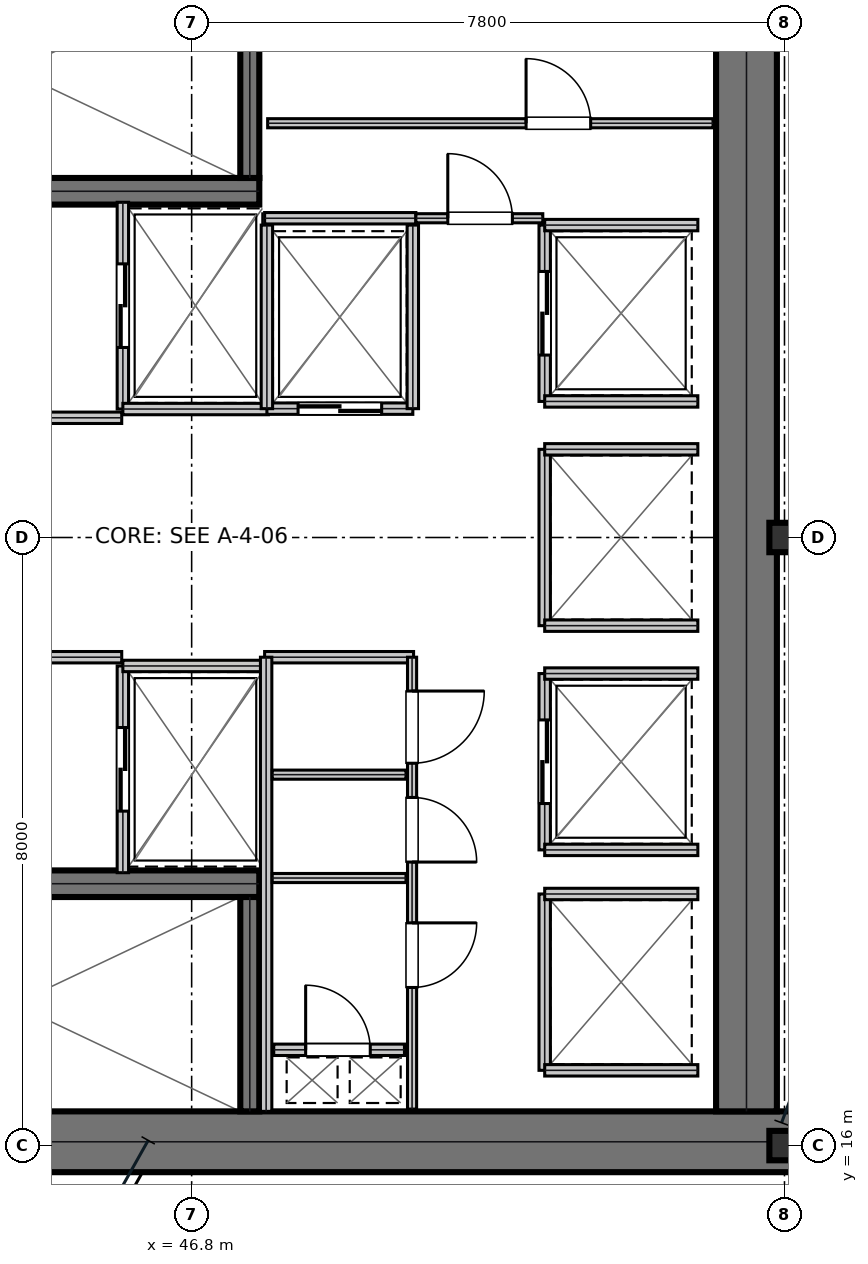
"""IFC4 building model, lengths in metres.
Left out: names, types, materials, properties, quantities, classifications, styles, units other than length and angle.
Written with IfcOpenShell. Run it as: python <this file> out.ifc"""

import sys

from ifc_helpers import new_model, si_unit, direction, frame, frame_2d, origin, origin_2d, place, context, subcontext, project, spatial, rectangle, i_section, extrude, element, fill, save


model = new_model("IFC4")
c1 = context("Model", 3, precision=1e-05, world=origin(), true_north=direction((0.0, 1.0)))
c2 = subcontext(c1, "Body", "Model", "MODEL_VIEW")
j1 = project(units=[si_unit("LENGTHUNIT", "METRE"), si_unit("PLANEANGLEUNIT", "RADIAN")], contexts=[c1])
p1 = place(None, origin())
s1 = spatial("IfcSite", under=j1, at=p1, CompositionType="ELEMENT")
p2 = place(p1, origin())
s2 = spatial("IfcBuilding", under=s1, at=p2, CompositionType="ELEMENT")
p3 = place(p2, frame((0.0, 0.0, 165.45)))
s3 = spatial("IfcBuildingStorey", under=s2, at=p3, CompositionType="ELEMENT", Elevation=165.45)
p4 = place(p3, frame((38.8, 16.05, 0.0), z_axis=(0.0, 0.0, 1.0), x_axis=(1.0, 0.0, 0.0)))
e1 = element("IfcWall", 1, at=p4, inside=s3, PredefinedType="SHEAR", context=c2, shape_type="SweptSolid", body=[
    extrude(rectangle(XDim=16.0, YDim=0.8, at=frame_2d((8.0, 0.0))), origin(), (0.0, 0.0, 1.0), 3.81),
])
p5 = place(p3, frame((54.1, 16.45, 0.0), z_axis=(0.0, 0.0, 1.0), x_axis=(0.0, 1.0, 0.0)))
e2 = element("IfcWall", 2, at=p5, inside=s3, PredefinedType="SHEAR", context=c2, shape_type="SweptSolid", body=[
    extrude(rectangle(XDim=15.1, YDim=0.8, at=frame_2d((7.55, 0.0))), origin(), (0.0, 0.0, 1.0), 3.81),
])
p6 = place(p3, frame((39.98, 28.555, 0.0), z_axis=(0.0, 0.0, 1.0), x_axis=(1.0, 0.0, 0.0)))
e3 = element("IfcWall", 3, at=p6, inside=s3, PredefinedType="SHEAR", context=c2, shape_type="SweptSolid", body=[
    extrude(rectangle(XDim=7.71, YDim=0.35, at=frame_2d((3.855, 0.0))), origin(), (0.0, 0.0, 1.0), 3.81),
])
p7 = place(p6, frame((0.25, 0.0, 0.0)))
e4 = element("IfcOpeningElement", 4, at=p7, cuts=e3, PredefinedType="OPENING", context=c2, shape_type="SweptSolid", body=[
    extrude(rectangle(XDim=1.1, YDim=2.15, at=frame_2d((0.55, 1.075))), frame((0.0, 0.185, 0.0), z_axis=(0.0, -1.0, 0.0), x_axis=(1.0, 0.0, 0.0)), (0.0, 0.0, 1.0), 0.37),
])
p8 = place(p3, frame((39.98, 19.445, 0.0), z_axis=(0.0, 0.0, 1.0), x_axis=(1.0, 0.0, 0.0)))
e5 = element("IfcWall", 5, at=p8, inside=s3, PredefinedType="SHEAR", context=c2, shape_type="SweptSolid", body=[
    extrude(rectangle(XDim=7.71, YDim=0.35, at=frame_2d((3.855, 0.0))), origin(), (0.0, 0.0, 1.0), 3.81),
])
p9 = place(p8, frame((0.25, 0.0, 0.0)))
e6 = element("IfcOpeningElement", 6, at=p9, cuts=e5, PredefinedType="OPENING", context=c2, shape_type="SweptSolid", body=[
    extrude(rectangle(XDim=1.1, YDim=2.15, at=frame_2d((0.55, 1.075))), frame((0.0, 0.185, 0.0), z_axis=(0.0, -1.0, 0.0), x_axis=(1.0, 0.0, 0.0)), (0.0, 0.0, 1.0), 0.37),
])
for number, where, z_axis, x_axis in (
    (7, (47.565, 28.73, 0.0), (0.0, 0.0, 1.0), (0.0, 1.0, 0.0)),
    (8, (47.565, 16.45, 0.0), (0.0, 0.0, 1.0), (0.0, 1.0, 0.0)),
):
    element("IfcWall", number, at=place(p3, frame(where, z_axis=z_axis, x_axis=x_axis)), inside=s3, PredefinedType="SHEAR", context=c2, shape_type="SweptSolid", body=[
        extrude(rectangle(XDim=2.82, YDim=0.25, at=frame_2d((1.41, 0.0))), origin(), (0.0, 0.0, 1.0), 3.81),
    ])
for number, where, z_axis, x_axis in (
    (9, (54.6, 16.0, 0.0), (0.0, 0.0, 1.0), (1.0, 0.0, 0.0)),
    (10, (54.6, 24.0, 0.0), (0.0, 0.0, 1.0), (1.0, 0.0, 0.0)),
):
    element("IfcColumn", number, at=place(p3, frame(where, z_axis=z_axis, x_axis=x_axis)), inside=s3, PredefinedType="COLUMN", context=c2, shape_type="SweptSolid", body=[
        extrude(i_section(OverallWidth=0.398, OverallDepth=0.387, WebThickness=0.021, FlangeThickness=0.033, at=origin_2d()), origin(), (0.0, 0.0, 1.0), 4.044),
    ])
p10 = place(p3, frame((39.98, 25.575, 0.0), z_axis=(0.0, 0.0, 1.0), x_axis=(1.0, 0.0, 0.0)))
e11 = element("IfcWall", 11, at=p10, inside=s3, PredefinedType="PARTITIONING", context=c2, shape_type="SweptSolid", body=[
    extrude(rectangle(XDim=5.9, YDim=0.15, at=frame_2d((2.95, 0.0))), origin(), (0.0, 0.0, 1.0), 3.81),
])
p11 = place(p10, frame((2.35, 0.0, 0.0)))
e12 = element("IfcOpeningElement", 12, at=p11, cuts=e11, PredefinedType="OPENING", context=c2, shape_type="SweptSolid", body=[
    extrude(rectangle(XDim=1.05, YDim=2.15, at=frame_2d((0.525, 1.075))), frame((0.0, 0.085, 0.0), z_axis=(0.0, -1.0, 0.0), x_axis=(1.0, 0.0, 0.0)), (0.0, 0.0, 1.0), 0.17),
])
p12 = place(p3, frame((39.98, 22.425, 0.0), z_axis=(0.0, 0.0, 1.0), x_axis=(1.0, 0.0, 0.0)))
e13 = element("IfcWall", 13, at=p12, inside=s3, PredefinedType="PARTITIONING", context=c2, shape_type="SweptSolid", body=[
    extrude(rectangle(XDim=5.9, YDim=0.15, at=frame_2d((2.95, 0.0))), origin(), (0.0, 0.0, 1.0), 3.81),
])
p13 = place(p12, frame((2.35, 0.0, 0.0)))
e14 = element("IfcOpeningElement", 14, at=p13, cuts=e13, PredefinedType="OPENING", context=c2, shape_type="SweptSolid", body=[
    extrude(rectangle(XDim=1.05, YDim=2.15, at=frame_2d((0.525, 1.075))), frame((0.0, 0.085, 0.0), z_axis=(0.0, -1.0, 0.0), x_axis=(1.0, 0.0, 0.0)), (0.0, 0.0, 1.0), 0.17),
])
p14 = place(p3, frame((45.895, 25.69, 0.0), z_axis=(0.0, 0.0, 1.0), x_axis=(0.0, 1.0, 0.0)))
e15 = element("IfcWall", 15, at=p14, inside=s3, PredefinedType="PARTITIONING", context=c2, shape_type="SweptSolid", body=[
    extrude(rectangle(XDim=2.72, YDim=0.15, at=frame_2d((1.36, 0.0))), origin(), (0.0, 0.0, 1.0), 3.81),
])
p15 = place(p14, frame((0.81, 0.0, 0.0)))
e16 = element("IfcOpeningElement", 16, at=p15, cuts=e15, PredefinedType="OPENING", context=c2, shape_type="SweptSolid", body=[
    extrude(rectangle(XDim=1.1, YDim=2.15, at=frame_2d((0.55, 1.075))), frame((0.0, 0.085, 0.0), z_axis=(0.0, -1.0, 0.0), x_axis=(1.0, 0.0, 0.0)), (0.0, 0.0, 1.0), 0.17),
])
p16 = place(p3, frame((45.895, 25.69, 0.0), z_axis=(0.0, 0.0, 1.0), x_axis=(1.0, 0.0, 0.0)))
e17 = element("IfcWall", 17, at=p16, inside=s3, PredefinedType="PARTITIONING", context=c2, shape_type="SweptSolid", body=[
    extrude(rectangle(XDim=1.915, YDim=0.15, at=frame_2d((0.958, 0.0))), origin(), (0.0, 0.0, 1.0), 3.81),
])
p17 = place(p3, frame((45.895, 19.59, 0.0), z_axis=(0.0, 0.0, 1.0), x_axis=(0.0, 1.0, 0.0)))
e18 = element("IfcWall", 18, at=p17, inside=s3, PredefinedType="PARTITIONING", context=c2, shape_type="SweptSolid", body=[
    extrude(rectangle(XDim=2.72, YDim=0.15, at=frame_2d((1.36, 0.0))), origin(), (0.0, 0.0, 1.0), 3.81),
])
p18 = place(p17, frame((0.81, 0.0, 0.0)))
e19 = element("IfcOpeningElement", 19, at=p18, cuts=e18, PredefinedType="OPENING", context=c2, shape_type="SweptSolid", body=[
    extrude(rectangle(XDim=1.1, YDim=2.15, at=frame_2d((0.55, 1.075))), frame((0.0, 0.085, 0.0), z_axis=(0.0, -1.0, 0.0), x_axis=(1.0, 0.0, 0.0)), (0.0, 0.0, 1.0), 0.17),
])
p19 = place(p3, frame((45.895, 22.31, 0.0), z_axis=(0.0, 0.0, 1.0), x_axis=(1.0, 0.0, 0.0)))
e20 = element("IfcWall", 20, at=p19, inside=s3, PredefinedType="PARTITIONING", context=c2, shape_type="SweptSolid", body=[
    extrude(rectangle(XDim=1.915, YDim=0.15, at=frame_2d((0.958, 0.0))), origin(), (0.0, 0.0, 1.0), 3.81),
])
p20 = place(p3, frame((47.79, 25.695, 0.0), z_axis=(0.0, 0.0, 1.0), x_axis=(1.0, 0.0, 0.0)))
e21 = element("IfcWall", 21, at=p20, inside=s3, PredefinedType="PARTITIONING", context=c2, shape_type="SweptSolid", body=[
    extrude(rectangle(XDim=1.92, YDim=0.15, at=frame_2d((0.96, 0.0))), origin(), (0.0, 0.0, 1.0), 3.81),
])
p21 = place(p20, frame((0.41, 0.0, 0.0)))
e22 = element("IfcOpeningElement", 22, at=p21, cuts=e21, PredefinedType="OPENING", context=c2, shape_type="SweptSolid", body=[
    extrude(rectangle(XDim=1.1, YDim=2.15, at=frame_2d((0.55, 1.075))), frame((0.0, 0.085, 0.0), z_axis=(0.0, -1.0, 0.0), x_axis=(1.0, 0.0, 0.0)), (0.0, 0.0, 1.0), 0.17),
])
for number, where, z_axis, x_axis in (
    (23, (47.79, 25.695, 0.0), (0.0, 0.0, 1.0), (0.0, 1.0, 0.0)),
    (24, (49.71, 25.695, 0.0), (0.0, 0.0, 1.0), (0.0, 1.0, 0.0)),
):
    element("IfcWall", number, at=place(p3, frame(where, z_axis=z_axis, x_axis=x_axis)), inside=s3, PredefinedType="PARTITIONING", context=c2, shape_type="SweptSolid", body=[
        extrude(rectangle(XDim=2.415, YDim=0.15, at=frame_2d((1.208, 0.0))), origin(), (0.0, 0.0, 1.0), 3.81),
    ])
p22 = place(p3, frame((51.445, 25.79, 0.0), z_axis=(0.0, 0.0, 1.0), x_axis=(0.0, 1.0, 0.0)))
e25 = element("IfcWall", 25, at=p22, inside=s3, PredefinedType="PARTITIONING", context=c2, shape_type="SweptSolid", body=[
    extrude(rectangle(XDim=2.32, YDim=0.15, at=frame_2d((1.16, 0.0))), origin(), (0.0, 0.0, 1.0), 3.81),
])
p23 = place(p22, frame((0.61, 0.0, 0.0)))
e26 = element("IfcOpeningElement", 26, at=p23, cuts=e25, PredefinedType="OPENING", context=c2, shape_type="SweptSolid", body=[
    extrude(rectangle(XDim=1.1, YDim=2.15, at=frame_2d((0.55, 1.075))), frame((0.0, 0.085, 0.0), z_axis=(0.0, -1.0, 0.0), x_axis=(1.0, 0.0, 0.0)), (0.0, 0.0, 1.0), 0.17),
])
for number, where, z_axis, x_axis in (
    (27, (51.445, 25.79, 0.0), (0.0, 0.0, 1.0), (1.0, 0.0, 0.0)),
    (28, (51.445, 28.11, 0.0), (0.0, 0.0, 1.0), (1.0, 0.0, 0.0)),
):
    element("IfcWall", number, at=place(p3, frame(where, z_axis=z_axis, x_axis=x_axis)), inside=s3, PredefinedType="PARTITIONING", context=c2, shape_type="SweptSolid", body=[
        extrude(rectangle(XDim=2.015, YDim=0.15, at=frame_2d((1.007, 0.0))), origin(), (0.0, 0.0, 1.0), 3.81),
    ])
p24 = place(p3, frame((51.445, 19.89, 0.0), z_axis=(0.0, 0.0, 1.0), x_axis=(0.0, 1.0, 0.0)))
e29 = element("IfcWall", 29, at=p24, inside=s3, PredefinedType="PARTITIONING", context=c2, shape_type="SweptSolid", body=[
    extrude(rectangle(XDim=2.32, YDim=0.15, at=frame_2d((1.16, 0.0))), origin(), (0.0, 0.0, 1.0), 3.81),
])
p25 = place(p24, frame((0.61, 0.0, 0.0)))
e30 = element("IfcOpeningElement", 30, at=p25, cuts=e29, PredefinedType="OPENING", context=c2, shape_type="SweptSolid", body=[
    extrude(rectangle(XDim=1.1, YDim=2.15, at=frame_2d((0.55, 1.075))), frame((0.0, 0.085, 0.0), z_axis=(0.0, -1.0, 0.0), x_axis=(1.0, 0.0, 0.0)), (0.0, 0.0, 1.0), 0.17),
])
for number, where, z_axis, x_axis in (
    (31, (51.445, 19.89, 0.0), (0.0, 0.0, 1.0), (1.0, 0.0, 0.0)),
    (32, (51.445, 22.21, 0.0), (0.0, 0.0, 1.0), (1.0, 0.0, 0.0)),
):
    element("IfcWall", number, at=place(p3, frame(where, z_axis=z_axis, x_axis=x_axis)), inside=s3, PredefinedType="PARTITIONING", context=c2, shape_type="SweptSolid", body=[
        extrude(rectangle(XDim=2.015, YDim=0.15, at=frame_2d((1.007, 0.0))), origin(), (0.0, 0.0, 1.0), 3.81),
    ])
p26 = place(p3, frame((51.445, 22.84, 0.0), z_axis=(0.0, 0.0, 1.0), x_axis=(0.0, 1.0, 0.0)))
e33 = element("IfcWall", 33, at=p26, inside=s3, PredefinedType="PARTITIONING", context=c2, shape_type="SweptSolid", body=[
    extrude(rectangle(XDim=2.32, YDim=0.15, at=frame_2d((1.16, 0.0))), origin(), (0.0, 0.0, 1.0), 3.81),
])
for number, where, z_axis, x_axis in (
    (34, (51.445, 22.84, 0.0), (0.0, 0.0, 1.0), (1.0, 0.0, 0.0)),
    (35, (51.445, 25.16, 0.0), (0.0, 0.0, 1.0), (1.0, 0.0, 0.0)),
):
    element("IfcWall", number, at=place(p3, frame(where, z_axis=z_axis, x_axis=x_axis)), inside=s3, PredefinedType="PARTITIONING", context=c2, shape_type="SweptSolid", body=[
        extrude(rectangle(XDim=2.015, YDim=0.15, at=frame_2d((1.007, 0.0))), origin(), (0.0, 0.0, 1.0), 3.81),
    ])
p27 = place(p3, frame((51.445, 16.99, 0.0), z_axis=(0.0, 0.0, 1.0), x_axis=(0.0, 1.0, 0.0)))
e36 = element("IfcWall", 36, at=p27, inside=s3, PredefinedType="PARTITIONING", context=c2, shape_type="SweptSolid", body=[
    extrude(rectangle(XDim=2.32, YDim=0.15, at=frame_2d((1.16, 0.0))), origin(), (0.0, 0.0, 1.0), 3.81),
])
for number, where, z_axis, x_axis in (
    (37, (51.445, 16.99, 0.0), (0.0, 0.0, 1.0), (1.0, 0.0, 0.0)),
    (38, (51.445, 19.31, 0.0), (0.0, 0.0, 1.0), (1.0, 0.0, 0.0)),
):
    element("IfcWall", number, at=place(p3, frame(where, z_axis=z_axis, x_axis=x_axis)), inside=s3, PredefinedType="PARTITIONING", context=c2, shape_type="SweptSolid", body=[
        extrude(rectangle(XDim=2.015, YDim=0.15, at=frame_2d((1.007, 0.0))), origin(), (0.0, 0.0, 1.0), 3.81),
    ])
p28 = place(p3, frame((47.88, 17.26, 0.0), z_axis=(0.0, 0.0, 1.0), x_axis=(1.0, 0.0, 0.0)))
e39 = element("IfcWall", 39, at=p28, inside=s3, PredefinedType="PARTITIONING", context=c2, shape_type="SweptSolid", body=[
    extrude(rectangle(XDim=1.72, YDim=0.15, at=frame_2d((0.86, 0.0))), origin(), (0.0, 0.0, 1.0), 3.81),
])
p29 = place(p28, frame((0.42, 0.0, 0.0)))
e40 = element("IfcOpeningElement", 40, at=p29, cuts=e39, PredefinedType="OPENING", context=c2, shape_type="SweptSolid", body=[
    extrude(rectangle(XDim=0.85, YDim=2.15, at=frame_2d((0.425, 1.075))), frame((0.0, 0.085, 0.0), z_axis=(0.0, -1.0, 0.0), x_axis=(1.0, 0.0, 0.0)), (0.0, 0.0, 1.0), 0.17),
])
p30 = place(p3, frame((47.76, 22.425, 0.0), z_axis=(0.0, 0.0, 1.0), x_axis=(1.0, 0.0, 0.0)))
e41 = element("IfcWall", 41, at=p30, inside=s3, PredefinedType="PARTITIONING", context=c2, shape_type="SweptSolid", body=[
    extrude(rectangle(XDim=1.96, YDim=0.15, at=frame_2d((0.98, 0.0))), origin(), (0.0, 0.0, 1.0), 3.81),
])
p31 = place(p3, frame((47.78, 16.45, 0.0), z_axis=(0.0, 0.0, 1.0), x_axis=(0.0, 1.0, 0.0)))
e42 = element("IfcWall", 42, at=p31, inside=s3, PredefinedType="PARTITIONING", context=c2, shape_type="SweptSolid", body=[
    extrude(rectangle(XDim=5.975, YDim=0.15, at=frame_2d((2.988, 0.0))), origin(), (0.0, 0.0, 1.0), 3.81),
])
for number, where, z_axis, x_axis in (
    (43, (47.86, 19.52, 0.0), (0.0, 0.0, 1.0), (1.0, 0.0, 0.0)),
    (44, (47.86, 20.88, 0.0), (0.0, 0.0, 1.0), (1.0, 0.0, 0.0)),
):
    element("IfcWall", number, at=place(p3, frame(where, z_axis=z_axis, x_axis=x_axis)), inside=s3, PredefinedType="PARTITIONING", context=c2, shape_type="SweptSolid", body=[
        extrude(rectangle(XDim=1.76, YDim=0.12, at=frame_2d((0.88, 0.0))), origin(), (0.0, 0.0, 1.0), 3.81),
    ])
p32 = place(p3, frame((49.7, 16.48, 0.0), z_axis=(0.0, 0.0, 1.0), x_axis=(0.0, 1.0, 0.0)))
e45 = element("IfcWall", 45, at=p32, inside=s3, PredefinedType="PARTITIONING", context=c2, shape_type="SweptSolid", body=[
    extrude(rectangle(XDim=5.945, YDim=0.12, at=frame_2d((2.973, 0.0))), origin(), (0.0, 0.0, 1.0), 3.81),
])
p33 = place(p32, frame((1.6, 0.0, 0.0)))
e46 = element("IfcOpeningElement", 46, at=p33, cuts=e45, PredefinedType="OPENING", context=c2, shape_type="SweptSolid", body=[
    extrude(rectangle(XDim=0.85, YDim=2.15, at=frame_2d((0.425, 1.075))), frame((0.0, 0.07, 0.0), z_axis=(0.0, -1.0, 0.0), x_axis=(1.0, 0.0, 0.0)), (0.0, 0.0, 1.0), 0.14),
])
p34 = place(p32, frame((3.25, 0.0, 0.0)))
e47 = element("IfcOpeningElement", 47, at=p34, cuts=e45, PredefinedType="OPENING", context=c2, shape_type="SweptSolid", body=[
    extrude(rectangle(XDim=0.85, YDim=2.15, at=frame_2d((0.425, 1.075))), frame((0.0, 0.07, 0.0), z_axis=(0.0, -1.0, 0.0), x_axis=(1.0, 0.0, 0.0)), (0.0, 0.0, 1.0), 0.14),
])
p35 = place(p32, frame((4.55, 0.0, 0.0)))
e48 = element("IfcOpeningElement", 48, at=p35, cuts=e45, PredefinedType="OPENING", context=c2, shape_type="SweptSolid", body=[
    extrude(rectangle(XDim=0.95, YDim=2.15, at=frame_2d((0.475, 1.075))), frame((0.0, 0.07, 0.0), z_axis=(0.0, -1.0, 0.0), x_axis=(1.0, 0.0, 0.0)), (0.0, 0.0, 1.0), 0.14),
])
p36 = place(p3, frame((47.76, 28.2, 0.0), z_axis=(0.0, 0.0, 1.0), x_axis=(1.0, 0.0, 0.0)))
e49 = element("IfcWall", 49, at=p36, inside=s3, PredefinedType="PARTITIONING", context=c2, shape_type="SweptSolid", body=[
    extrude(rectangle(XDim=1.99, YDim=0.15, at=frame_2d((0.995, 0.0))), origin(), (0.0, 0.0, 1.0), 3.81),
])
p37 = place(p3, frame((49.75, 28.2, 0.0), z_axis=(0.0, 0.0, 1.0), x_axis=(1.0, 0.0, 0.0)))
e50 = element("IfcWall", 50, at=p37, inside=s3, PredefinedType="PARTITIONING", context=c2, shape_type="SweptSolid", body=[
    extrude(rectangle(XDim=1.67, YDim=0.12, at=frame_2d((0.835, 0.0))), origin(), (0.0, 0.0, 1.0), 3.81),
])
p38 = place(p37, frame((0.42, 0.0, 0.0)))
e51 = element("IfcOpeningElement", 51, at=p38, cuts=e50, PredefinedType="OPENING", context=c2, shape_type="SweptSolid", body=[
    extrude(rectangle(XDim=0.85, YDim=2.15, at=frame_2d((0.425, 1.075))), frame((0.0, 0.07, 0.0), z_axis=(0.0, -1.0, 0.0), x_axis=(1.0, 0.0, 0.0)), (0.0, 0.0, 1.0), 0.14),
])
p39 = place(p3, frame((47.8, 29.45, 0.0), z_axis=(0.0, 0.0, 1.0), x_axis=(1.0, 0.0, 0.0)))
e52 = element("IfcWall", 52, at=p39, inside=s3, PredefinedType="PARTITIONING", context=c2, shape_type="SweptSolid", body=[
    extrude(rectangle(XDim=5.86, YDim=0.12, at=frame_2d((2.93, 0.0))), origin(), (0.0, 0.0, 1.0), 3.81),
])
p40 = place(p39, frame((3.4, 0.0, 0.0)))
e53 = element("IfcOpeningElement", 53, at=p40, cuts=e52, PredefinedType="OPENING", context=c2, shape_type="SweptSolid", body=[
    extrude(rectangle(XDim=0.85, YDim=2.15, at=frame_2d((0.425, 1.075))), frame((0.0, 0.07, 0.0), z_axis=(0.0, -1.0, 0.0), x_axis=(1.0, 0.0, 0.0)), (0.0, 0.0, 1.0), 0.14),
])
p41 = place(p15, frame((1.1, 0.0, 0.0), z_axis=(0.0, 0.0, 1.0), x_axis=(-1.0, 0.0, 0.0)))
e54 = element("IfcDoor", 54, at=p41, inside=s3, OperationType="DOUBLE_DOOR_SLIDING", PredefinedType="DOOR", context=c2, shape_type="SweptSolid", body=[
    extrude(rectangle(XDim=1.1, YDim=2.15, at=frame_2d((0.55, 1.075))), frame((0.0, 0.025, 0.0), z_axis=(0.0, -1.0, 0.0), x_axis=(1.0, 0.0, 0.0)), (0.0, 0.0, 1.0), 0.05),
])
fill(e16, e54)
p42 = place(p18, frame((1.1, 0.0, 0.0), z_axis=(0.0, 0.0, 1.0), x_axis=(-1.0, 0.0, 0.0)))
e55 = element("IfcDoor", 55, at=p42, inside=s3, OperationType="DOUBLE_DOOR_SLIDING", PredefinedType="DOOR", context=c2, shape_type="SweptSolid", body=[
    extrude(rectangle(XDim=1.1, YDim=2.15, at=frame_2d((0.55, 1.075))), frame((0.0, 0.025, 0.0), z_axis=(0.0, -1.0, 0.0), x_axis=(1.0, 0.0, 0.0)), (0.0, 0.0, 1.0), 0.05),
])
fill(e19, e55)
p43 = place(p21, frame((1.1, 0.0, 0.0), z_axis=(0.0, 0.0, 1.0), x_axis=(-1.0, 0.0, 0.0)))
e56 = element("IfcDoor", 56, at=p43, inside=s3, OperationType="DOUBLE_DOOR_SLIDING", PredefinedType="DOOR", context=c2, shape_type="SweptSolid", body=[
    extrude(rectangle(XDim=1.1, YDim=2.15, at=frame_2d((0.55, 1.075))), frame((0.0, 0.025, 0.0), z_axis=(0.0, -1.0, 0.0), x_axis=(1.0, 0.0, 0.0)), (0.0, 0.0, 1.0), 0.05),
])
fill(e22, e56)
p44 = place(p23, frame((1.1, 0.0, 0.0), z_axis=(0.0, 0.0, 1.0), x_axis=(-1.0, 0.0, 0.0)))
e57 = element("IfcDoor", 57, at=p44, inside=s3, OperationType="DOUBLE_DOOR_SLIDING", PredefinedType="DOOR", context=c2, shape_type="SweptSolid", body=[
    extrude(rectangle(XDim=1.1, YDim=2.15, at=frame_2d((0.55, 1.075))), frame((0.0, 0.025, 0.0), z_axis=(0.0, -1.0, 0.0), x_axis=(1.0, 0.0, 0.0)), (0.0, 0.0, 1.0), 0.05),
])
fill(e26, e57)
p45 = place(p25, frame((1.1, 0.0, 0.0), z_axis=(0.0, 0.0, 1.0), x_axis=(-1.0, 0.0, 0.0)))
e58 = element("IfcDoor", 58, at=p45, inside=s3, OperationType="DOUBLE_DOOR_SLIDING", PredefinedType="DOOR", context=c2, shape_type="SweptSolid", body=[
    extrude(rectangle(XDim=1.1, YDim=2.15, at=frame_2d((0.55, 1.075))), frame((0.0, 0.025, 0.0), z_axis=(0.0, -1.0, 0.0), x_axis=(1.0, 0.0, 0.0)), (0.0, 0.0, 1.0), 0.05),
])
fill(e30, e58)
p46 = place(p29, origin())
e59 = element("IfcDoor", 59, at=p46, inside=s3, OperationType="SINGLE_SWING_LEFT", PredefinedType="TRAPDOOR", context=c2, shape_type="SweptSolid", body=[
    extrude(rectangle(XDim=0.85, YDim=2.15, at=frame_2d((0.425, 1.075))), frame((0.0, 0.025, 0.0), z_axis=(0.0, -1.0, 0.0), x_axis=(1.0, 0.0, 0.0)), (0.0, 0.0, 1.0), 0.05),
])
fill(e40, e59)
p47 = place(p33, frame((0.85, 0.0, 0.0), z_axis=(0.0, 0.0, 1.0), x_axis=(-1.0, 0.0, 0.0)))
e60 = element("IfcDoor", 60, at=p47, inside=s3, OperationType="SINGLE_SWING_LEFT", PredefinedType="DOOR", context=c2, shape_type="SweptSolid", body=[
    extrude(rectangle(XDim=0.85, YDim=2.15, at=frame_2d((0.425, 1.075))), frame((0.0, 0.025, 0.0), z_axis=(0.0, -1.0, 0.0), x_axis=(1.0, 0.0, 0.0)), (0.0, 0.0, 1.0), 0.05),
])
fill(e46, e60)
p48 = place(p34, frame((0.85, 0.0, 0.0), z_axis=(0.0, 0.0, 1.0), x_axis=(-1.0, 0.0, 0.0)))
e61 = element("IfcDoor", 61, at=p48, inside=s3, OperationType="SINGLE_SWING_RIGHT", PredefinedType="DOOR", context=c2, shape_type="SweptSolid", body=[
    extrude(rectangle(XDim=0.85, YDim=2.15, at=frame_2d((0.425, 1.075))), frame((0.0, 0.025, 0.0), z_axis=(0.0, -1.0, 0.0), x_axis=(1.0, 0.0, 0.0)), (0.0, 0.0, 1.0), 0.05),
])
fill(e47, e61)
p49 = place(p35, frame((0.95, 0.0, 0.0), z_axis=(0.0, 0.0, 1.0), x_axis=(-1.0, 0.0, 0.0)))
e62 = element("IfcDoor", 62, at=p49, inside=s3, OperationType="SINGLE_SWING_LEFT", PredefinedType="DOOR", context=c2, shape_type="SweptSolid", body=[
    extrude(rectangle(XDim=0.95, YDim=2.15, at=frame_2d((0.475, 1.075))), frame((0.0, 0.025, 0.0), z_axis=(0.0, -1.0, 0.0), x_axis=(1.0, 0.0, 0.0)), (0.0, 0.0, 1.0), 0.05),
])
fill(e48, e62)
p50 = place(p38, origin())
e63 = element("IfcDoor", 63, at=p50, inside=s3, OperationType="SINGLE_SWING_LEFT", PredefinedType="DOOR", context=c2, shape_type="SweptSolid", body=[
    extrude(rectangle(XDim=0.85, YDim=2.15, at=frame_2d((0.425, 1.075))), frame((0.0, 0.025, 0.0), z_axis=(0.0, -1.0, 0.0), x_axis=(1.0, 0.0, 0.0)), (0.0, 0.0, 1.0), 0.05),
])
fill(e51, e63)
p51 = place(p40, origin())
e64 = element("IfcDoor", 64, at=p51, inside=s3, OperationType="SINGLE_SWING_LEFT", PredefinedType="DOOR", context=c2, shape_type="SweptSolid", body=[
    extrude(rectangle(XDim=0.85, YDim=2.15, at=frame_2d((0.425, 1.075))), frame((0.0, 0.025, 0.0), z_axis=(0.0, -1.0, 0.0), x_axis=(1.0, 0.0, 0.0)), (0.0, 0.0, 1.0), 0.05),
])
fill(e53, e64)
save(model, sys.argv[1])
